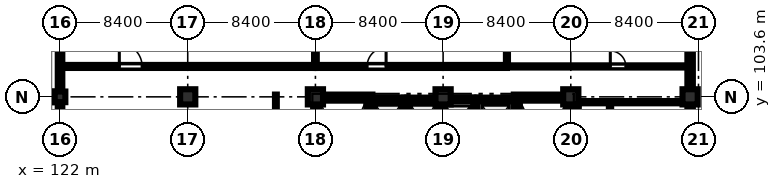
"""IFC4 building model, lengths in metres.
Left out: names, types, materials, properties, quantities, classifications, styles, units other than length and angle.
Written with IfcOpenShell. Run it as: python <this file> out.ifc"""

import sys

from ifc_helpers import new_model, si_unit, direction, frame, frame_2d, origin, origin_2d, place, context, subcontext, project, spatial, rectangle, extrude, element, fill, save


model = new_model("IFC4")
c1 = context("Model", 3, precision=1e-05, world=origin(), true_north=direction((0.0, 1.0)))
c2 = subcontext(c1, "Body", "Model", "MODEL_VIEW")
j1 = project(units=[si_unit("LENGTHUNIT", "METRE"), si_unit("PLANEANGLEUNIT", "RADIAN")], contexts=[c1])
p1 = place(None, origin())
s1 = spatial("IfcSite", under=j1, at=p1, CompositionType="ELEMENT")
p2 = place(p1, origin())
s2 = spatial("IfcBuilding", under=s1, at=p2, CompositionType="ELEMENT")
p3 = place(p2, frame((0.0, 0.0, 5.4)))
s3 = spatial("IfcBuildingStorey", under=s2, at=p3, CompositionType="ELEMENT", Elevation=5.4)
p4 = place(p3, frame((122.0, 103.6, 0.0), z_axis=(0.0, 0.0, 1.0), x_axis=(1.0, 0.0, 0.0)))
e1 = element("IfcColumn", 1, at=p4, inside=s3, PredefinedType="COLUMN", context=c2, shape_type="SweptSolid", body=[
    extrude(rectangle(XDim=0.7, YDim=0.7, at=origin_2d()), origin(), (0.0, 0.0, 1.0), 4.58),
])
for number, where, z_axis, x_axis in (
    (2, (130.4, 103.6, 0.0), (0.0, 0.0, 1.0), (1.0, 0.0, 0.0)),
    (3, (138.8, 103.6, 0.0), (0.0, 0.0, 1.0), (1.0, 0.0, 0.0)),
    (4, (147.2, 103.6, 0.0), (0.0, 0.0, 1.0), (1.0, 0.0, 0.0)),
    (5, (155.6, 103.6, 0.0), (0.0, 0.0, 1.0), (1.0, 0.0, 0.0)),
    (6, (163.45, 103.6, 0.0), (0.0, 0.0, 1.0), (1.0, 0.0, 0.0)),
):
    element("IfcColumn", number, at=place(p3, frame(where, z_axis=z_axis, x_axis=x_axis)), inside=s3, PredefinedType="COLUMN", context=c2, shape_type="SweptSolid", body=[
        extrude(rectangle(XDim=1.0, YDim=1.0, at=origin_2d()), origin(), (0.0, 0.0, 1.0), 4.58),
    ])
p5 = place(p3, frame((138.65, 103.55, 0.0), z_axis=(0.0, 0.0, 1.0), x_axis=(1.0, 0.0, 0.0)))
e7 = element("IfcWall", 7, at=p5, inside=s3, PredefinedType="SHEAR", context=c2, shape_type="SweptSolid", body=[
    extrude(rectangle(XDim=3.9, YDim=0.4, at=frame_2d((1.95, 0.0))), origin(), (0.0, 0.0, 1.0), 4.58),
])
p6 = place(p3, frame((138.85, 95.45, 0.0), z_axis=(0.0, 0.0, 1.0), x_axis=(0.0, 1.0, 0.0)))
e8 = element("IfcWall", 8, at=p6, inside=s3, PredefinedType="SHEAR", context=c2, shape_type="SweptSolid", body=[
    extrude(rectangle(XDim=7.9, YDim=0.4, at=frame_2d((3.95, 0.0))), origin(), (0.0, 0.0, 1.0), 4.58),
])
p7 = place(p3, frame((142.35, 95.45, 0.0), z_axis=(0.0, 0.0, 1.0), x_axis=(0.0, 1.0, 0.0)))
e9 = element("IfcWall", 9, at=p7, inside=s3, PredefinedType="SHEAR", context=c2, shape_type="SweptSolid", body=[
    extrude(rectangle(XDim=7.9, YDim=0.4, at=frame_2d((3.95, 0.0))), origin(), (0.0, 0.0, 1.0), 4.58),
])
p8 = place(p7, frame((0.22, 0.0, 0.0)))
e10 = element("IfcOpeningElement", 10, at=p8, cuts=e9, PredefinedType="OPENING", context=c2, shape_type="SweptSolid", body=[
    extrude(rectangle(XDim=1.15, YDim=2.15, at=frame_2d((0.575, 1.075))), frame((0.0, 0.21, 0.0), z_axis=(0.0, -1.0, 0.0), x_axis=(1.0, 0.0, 0.0)), (0.0, 0.0, 1.0), 0.42),
])
p9 = place(p3, frame((151.85, 103.55, 0.0), z_axis=(0.0, 0.0, 1.0), x_axis=(1.0, 0.0, 0.0)))
e11 = element("IfcWall", 11, at=p9, inside=s3, PredefinedType="SHEAR", context=c2, shape_type="SweptSolid", body=[
    extrude(rectangle(XDim=3.9, YDim=0.4, at=frame_2d((1.95, 0.0))), origin(), (0.0, 0.0, 1.0), 4.58),
])
p10 = place(p3, frame((152.05, 95.45, 0.0), z_axis=(0.0, 0.0, 1.0), x_axis=(0.0, 1.0, 0.0)))
e12 = element("IfcWall", 12, at=p10, inside=s3, PredefinedType="SHEAR", context=c2, shape_type="SweptSolid", body=[
    extrude(rectangle(XDim=7.9, YDim=0.4, at=frame_2d((3.95, 0.0))), origin(), (0.0, 0.0, 1.0), 4.58),
])
p11 = place(p10, frame((0.35, 0.0, 0.0)))
e13 = element("IfcOpeningElement", 13, at=p11, cuts=e12, PredefinedType="OPENING", context=c2, shape_type="SweptSolid", body=[
    extrude(rectangle(XDim=1.15, YDim=2.15, at=frame_2d((0.575, 1.075))), frame((0.0, 0.21, 0.0), z_axis=(0.0, -1.0, 0.0), x_axis=(1.0, 0.0, 0.0)), (0.0, 0.0, 1.0), 0.42),
])
p12 = place(p3, frame((155.55, 95.45, 0.0), z_axis=(0.0, 0.0, 1.0), x_axis=(0.0, 1.0, 0.0)))
e14 = element("IfcWall", 14, at=p12, inside=s3, PredefinedType="SHEAR", context=c2, shape_type="SweptSolid", body=[
    extrude(rectangle(XDim=7.9, YDim=0.4, at=frame_2d((3.95, 0.0))), origin(), (0.0, 0.0, 1.0), 4.58),
])
p13 = place(p3, frame((142.55, 103.425, 0.0), z_axis=(0.0, 0.0, 1.0), x_axis=(1.0, 0.0, 0.0)))
e15 = element("IfcWall", 15, at=p13, inside=s3, PredefinedType="SHEAR", context=c2, shape_type="SweptSolid", body=[
    extrude(rectangle(XDim=2.05, YDim=0.25, at=frame_2d((1.025, 0.0))), origin(), (0.0, 0.0, 1.0), 4.58),
])
p14 = place(p3, frame((144.725, 100.15, 0.0), z_axis=(0.0, 0.0, 1.0), x_axis=(0.0, 1.0, 0.0)))
e16 = element("IfcWall", 16, at=p14, inside=s3, PredefinedType="SHEAR", context=c2, shape_type="SweptSolid", body=[
    extrude(rectangle(XDim=3.4, YDim=0.25, at=frame_2d((1.7, 0.0))), origin(), (0.0, 0.0, 1.0), 4.58),
])
p15 = place(p3, frame((144.85, 103.425, 0.0), z_axis=(0.0, 0.0, 1.0), x_axis=(1.0, 0.0, 0.0)))
e17 = element("IfcWall", 17, at=p15, inside=s3, PredefinedType="SHEAR", context=c2, shape_type="SweptSolid", body=[
    extrude(rectangle(XDim=2.05, YDim=0.25, at=frame_2d((1.025, 0.0))), origin(), (0.0, 0.0, 1.0), 4.58),
])
p16 = place(p3, frame((147.025, 100.15, 0.0), z_axis=(0.0, 0.0, 1.0), x_axis=(0.0, 1.0, 0.0)))
e18 = element("IfcWall", 18, at=p16, inside=s3, PredefinedType="SHEAR", context=c2, shape_type="SweptSolid", body=[
    extrude(rectangle(XDim=3.4, YDim=0.25, at=frame_2d((1.7, 0.0))), origin(), (0.0, 0.0, 1.0), 4.58),
])
p17 = place(p3, frame((147.15, 103.425, 0.0), z_axis=(0.0, 0.0, 1.0), x_axis=(1.0, 0.0, 0.0)))
e19 = element("IfcWall", 19, at=p17, inside=s3, PredefinedType="SHEAR", context=c2, shape_type="SweptSolid", body=[
    extrude(rectangle(XDim=2.05, YDim=0.25, at=frame_2d((1.025, 0.0))), origin(), (0.0, 0.0, 1.0), 4.58),
])
p18 = place(p3, frame((149.325, 100.35, 0.0), z_axis=(0.0, 0.0, 1.0), x_axis=(0.0, 1.0, 0.0)))
e20 = element("IfcWall", 20, at=p18, inside=s3, PredefinedType="SHEAR", context=c2, shape_type="SweptSolid", body=[
    extrude(rectangle(XDim=3.2, YDim=0.25, at=frame_2d((1.6, 0.0))), origin(), (0.0, 0.0, 1.0), 4.58),
])
p19 = place(p3, frame((149.45, 103.425, 0.0), z_axis=(0.0, 0.0, 1.0), x_axis=(1.0, 0.0, 0.0)))
e21 = element("IfcWall", 21, at=p19, inside=s3, PredefinedType="SHEAR", context=c2, shape_type="SweptSolid", body=[
    extrude(rectangle(XDim=2.4, YDim=0.25, at=frame_2d((1.2, 0.0))), origin(), (0.0, 0.0, 1.0), 4.58),
])
p20 = place(p3, frame((163.45, 103.1, 0.0), z_axis=(0.0, 0.0, 1.0), x_axis=(0.0, -1.0, 0.0)))
e22 = element("IfcWall", 22, at=p20, inside=s3, PredefinedType="STANDARD", context=c2, shape_type="SweptSolid", body=[
    extrude(rectangle(XDim=7.4, YDim=0.36, at=frame_2d((3.7, 0.0))), origin(), (0.0, 0.0, 1.0), 3.83),
])
p21 = place(p20, frame((1.15, 0.0, 1.1)))
e23 = element("IfcOpeningElement", 23, at=p21, cuts=e22, PredefinedType="OPENING", context=c2, shape_type="SweptSolid", body=[
    extrude(rectangle(XDim=1.4, YDim=1.4, at=frame_2d((0.7, 0.7))), frame((0.0, 0.19, 0.0), z_axis=(0.0, -1.0, 0.0), x_axis=(1.0, 0.0, 0.0)), (0.0, 0.0, 1.0), 0.38),
])
p22 = place(p3, frame((163.45, 110.95, 0.0), z_axis=(0.0, 0.0, 1.0), x_axis=(0.0, -1.0, 0.0)))
e24 = element("IfcWall", 24, at=p22, inside=s3, PredefinedType="STANDARD", context=c2, shape_type="SweptSolid", body=[
    extrude(rectangle(XDim=6.85, YDim=0.36, at=frame_2d((3.425, 0.0))), origin(), (0.0, 0.0, 1.0), 3.83),
])
p23 = place(p22, frame((1.15, 0.0, 1.1)))
e25 = element("IfcOpeningElement", 25, at=p23, cuts=e24, PredefinedType="OPENING", context=c2, shape_type="SweptSolid", body=[
    extrude(rectangle(XDim=1.8, YDim=1.8, at=frame_2d((0.9, 0.9))), frame((0.0, 0.19, 0.0), z_axis=(0.0, -1.0, 0.0), x_axis=(1.0, 0.0, 0.0)), (0.0, 0.0, 1.0), 0.38),
])
p24 = place(p3, frame((122.0, 95.55, 0.0), z_axis=(0.0, 0.0, 1.0), x_axis=(0.0, 1.0, 0.0)))
e26 = element("IfcWall", 26, at=p24, inside=s3, PredefinedType="STANDARD", context=c2, shape_type="SweptSolid", body=[
    extrude(rectangle(XDim=7.7, YDim=0.3, at=frame_2d((3.85, 0.0))), origin(), (0.0, 0.0, 1.0), 3.83),
])
p25 = place(p3, frame((122.0, 103.95, 0.0), z_axis=(0.0, 0.0, 1.0), x_axis=(0.0, 1.0, 0.0)))
e27 = element("IfcWall", 27, at=p25, inside=s3, PredefinedType="STANDARD", context=c2, shape_type="SweptSolid", body=[
    extrude(rectangle(XDim=7.15, YDim=0.3, at=frame_2d((3.575, 0.0))), origin(), (0.0, 0.0, 1.0), 3.83),
])
p26 = place(p3, frame((158.18, 94.68, 0.0), z_axis=(0.0, 0.0, 1.0), x_axis=(0.0, 1.0, 0.0)))
e28 = element("IfcWall", 28, at=p26, inside=s3, PredefinedType="PARTITIONING", context=c2, shape_type="SweptSolid", body=[
    extrude(rectangle(XDim=8.57, YDim=0.15, at=frame_2d((4.285, 0.0))), origin(), (0.0, 0.0, 1.0), 4.58),
])
p27 = place(p26, frame((0.8, 0.0, 0.0)))
e29 = element("IfcOpeningElement", 29, at=p27, cuts=e28, PredefinedType="OPENING", context=c2, shape_type="SweptSolid", body=[
    extrude(rectangle(XDim=1.0, YDim=2.12, at=frame_2d((0.5, 1.06))), frame((0.0, 0.085, 0.0), z_axis=(0.0, -1.0, 0.0), x_axis=(1.0, 0.0, 0.0)), (0.0, 0.0, 1.0), 0.17),
])
p28 = place(p26, frame((3.5, 0.0, 0.0)))
e30 = element("IfcOpeningElement", 30, at=p28, cuts=e28, PredefinedType="OPENING", context=c2, shape_type="SweptSolid", body=[
    extrude(rectangle(XDim=0.92, YDim=2.1, at=frame_2d((0.46, 1.05))), frame((0.0, 0.085, 0.0), z_axis=(0.0, -1.0, 0.0), x_axis=(1.0, 0.0, 0.0)), (0.0, 0.0, 1.0), 0.17),
])
p29 = place(p26, frame((6.4, 0.0, 0.0)))
e31 = element("IfcOpeningElement", 31, at=p29, cuts=e28, PredefinedType="OPENING", context=c2, shape_type="SweptSolid", body=[
    extrude(rectangle(XDim=0.92, YDim=2.1, at=frame_2d((0.46, 1.05))), frame((0.0, 0.085, 0.0), z_axis=(0.0, -1.0, 0.0), x_axis=(1.0, 0.0, 0.0)), (0.0, 0.0, 1.0), 0.17),
])
p30 = place(p3, frame((156.05, 103.25, 0.0), z_axis=(0.0, 0.0, 1.0), x_axis=(1.0, 0.0, 0.0)))
e32 = element("IfcWall", 32, at=p30, inside=s3, PredefinedType="PARTITIONING", context=c2, shape_type="SweptSolid", body=[
    extrude(rectangle(XDim=7.15, YDim=0.15, at=frame_2d((3.575, 0.0))), origin(), (0.0, 0.0, 1.0), 4.58),
])
p31 = place(p3, frame((156.05, 94.68, 0.0), z_axis=(0.0, 0.0, 1.0), x_axis=(0.0, 1.0, 0.0)))
e33 = element("IfcWall", 33, at=p31, inside=s3, PredefinedType="PARTITIONING", context=c2, shape_type="SweptSolid", body=[
    extrude(rectangle(XDim=8.57, YDim=0.15, at=frame_2d((4.285, 0.0))), origin(), (0.0, 0.0, 1.0), 4.58),
])
p32 = place(p3, frame((136.2, 94.68, 0.0), z_axis=(0.0, 0.0, 1.0), x_axis=(0.0, 1.0, 0.0)))
e34 = element("IfcWall", 34, at=p32, inside=s3, PredefinedType="PARTITIONING", context=c2, shape_type="SweptSolid", body=[
    extrude(rectangle(XDim=9.07, YDim=0.12, at=frame_2d((4.535, 0.0))), origin(), (0.0, 0.0, 1.0), 4.58),
])
p33 = place(p3, frame((122.15, 105.6, 0.0), z_axis=(0.0, 0.0, 1.0), x_axis=(1.0, 0.0, 0.0)))
e35 = element("IfcWall", 35, at=p33, inside=s3, PredefinedType="SOLIDWALL", context=c2, shape_type="SweptSolid", body=[
    extrude(rectangle(XDim=16.65, YDim=0.2, at=frame_2d((8.325, 0.0))), origin(), (0.0, 0.0, 1.0), 4.58),
])
p34 = place(p33, frame((3.75, 0.0, 0.0)))
e36 = element("IfcOpeningElement", 36, at=p34, cuts=e35, PredefinedType="OPENING", context=c2, shape_type="SweptSolid", body=[
    extrude(rectangle(XDim=1.5, YDim=2.2, at=frame_2d((0.75, 1.1))), frame((0.0, 0.11, 0.0), z_axis=(0.0, -1.0, 0.0), x_axis=(1.0, 0.0, 0.0)), (0.0, 0.0, 1.0), 0.22),
])
p35 = place(p3, frame((138.8, 105.6, 0.0), z_axis=(0.0, 0.0, 1.0), x_axis=(1.0, 0.0, 0.0)))
e37 = element("IfcWall", 37, at=p35, inside=s3, PredefinedType="SOLIDWALL", context=c2, shape_type="SweptSolid", body=[
    extrude(rectangle(XDim=12.6, YDim=0.2, at=frame_2d((6.3, 0.0))), origin(), (0.0, 0.0, 1.0), 4.58),
])
p36 = place(p35, frame((3.4, 0.0, 0.0)))
e38 = element("IfcOpeningElement", 38, at=p36, cuts=e37, PredefinedType="OPENING", context=c2, shape_type="SweptSolid", body=[
    extrude(rectangle(XDim=1.25, YDim=2.2, at=frame_2d((0.625, 1.1))), frame((0.0, 0.11, 0.0), z_axis=(0.0, -1.0, 0.0), x_axis=(1.0, 0.0, 0.0)), (0.0, 0.0, 1.0), 0.22),
])
p37 = place(p3, frame((138.8, 105.6, 0.0), z_axis=(0.0, 0.0, 1.0), x_axis=(0.0, 1.0, 0.0)))
e39 = element("IfcWall", 39, at=p37, inside=s3, PredefinedType="STANDARD", context=c2, shape_type="SweptSolid", body=[
    extrude(rectangle(XDim=5.75, YDim=0.18, at=frame_2d((2.875, 0.0))), origin(), (0.0, 0.0, 1.0), 3.83),
])
p38 = place(p3, frame((151.4, 105.6, 0.0), z_axis=(0.0, 0.0, 1.0), x_axis=(1.0, 0.0, 0.0)))
e40 = element("IfcWall", 40, at=p38, inside=s3, PredefinedType="PARTITIONING", context=c2, shape_type="SweptSolid", body=[
    extrude(rectangle(XDim=11.95, YDim=0.145, at=frame_2d((5.975, 0.0))), origin(), (0.0, 0.0, 1.0), 4.58),
])
p39 = place(p38, frame((6.8, 0.0, 0.0)))
e41 = element("IfcOpeningElement", 41, at=p39, cuts=e40, PredefinedType="OPENING", context=c2, shape_type="SweptSolid", body=[
    extrude(rectangle(XDim=1.02, YDim=2.15, at=frame_2d((0.51, 1.075))), frame((0.0, 0.083, 0.0), z_axis=(0.0, -1.0, 0.0), x_axis=(1.0, 0.0, 0.0)), (0.0, 0.0, 1.0), 0.165),
])
p40 = place(p3, frame((151.4, 105.6, 0.0), z_axis=(0.0, 0.0, 1.0), x_axis=(0.0, 1.0, 0.0)))
e42 = element("IfcWall", 42, at=p40, inside=s3, PredefinedType="PARTITIONING", context=c2, shape_type="SweptSolid", body=[
    extrude(rectangle(XDim=5.75, YDim=0.135, at=frame_2d((2.875, 0.0))), origin(), (0.0, 0.0, 1.0), 4.03),
])
p41 = place(p34, origin())
e43 = element("IfcDoor", 43, at=p41, inside=s3, OperationType="SINGLE_SWING_LEFT", PredefinedType="DOOR", context=c2, shape_type="SweptSolid", body=[
    extrude(rectangle(XDim=1.5, YDim=2.2, at=frame_2d((0.75, 1.1))), frame((0.0, 0.025, 0.0), z_axis=(0.0, -1.0, 0.0), x_axis=(1.0, 0.0, 0.0)), (0.0, 0.0, 1.0), 0.05),
])
fill(e36, e43)
p42 = place(p36, origin())
e44 = element("IfcDoor", 44, at=p42, inside=s3, OperationType="SINGLE_SWING_RIGHT", PredefinedType="DOOR", context=c2, shape_type="SweptSolid", body=[
    extrude(rectangle(XDim=1.25, YDim=2.2, at=frame_2d((0.625, 1.1))), frame((0.0, 0.025, 0.0), z_axis=(0.0, -1.0, 0.0), x_axis=(1.0, 0.0, 0.0)), (0.0, 0.0, 1.0), 0.05),
])
fill(e38, e44)
p43 = place(p39, origin())
e45 = element("IfcDoor", 45, at=p43, inside=s3, OperationType="SINGLE_SWING_LEFT", PredefinedType="DOOR", context=c2, shape_type="SweptSolid", body=[
    extrude(rectangle(XDim=1.02, YDim=2.15, at=frame_2d((0.51, 1.075))), frame((0.0, 0.025, 0.0), z_axis=(0.0, -1.0, 0.0), x_axis=(1.0, 0.0, 0.0)), (0.0, 0.0, 1.0), 0.05),
])
fill(e41, e45)
save(model, sys.argv[1])
